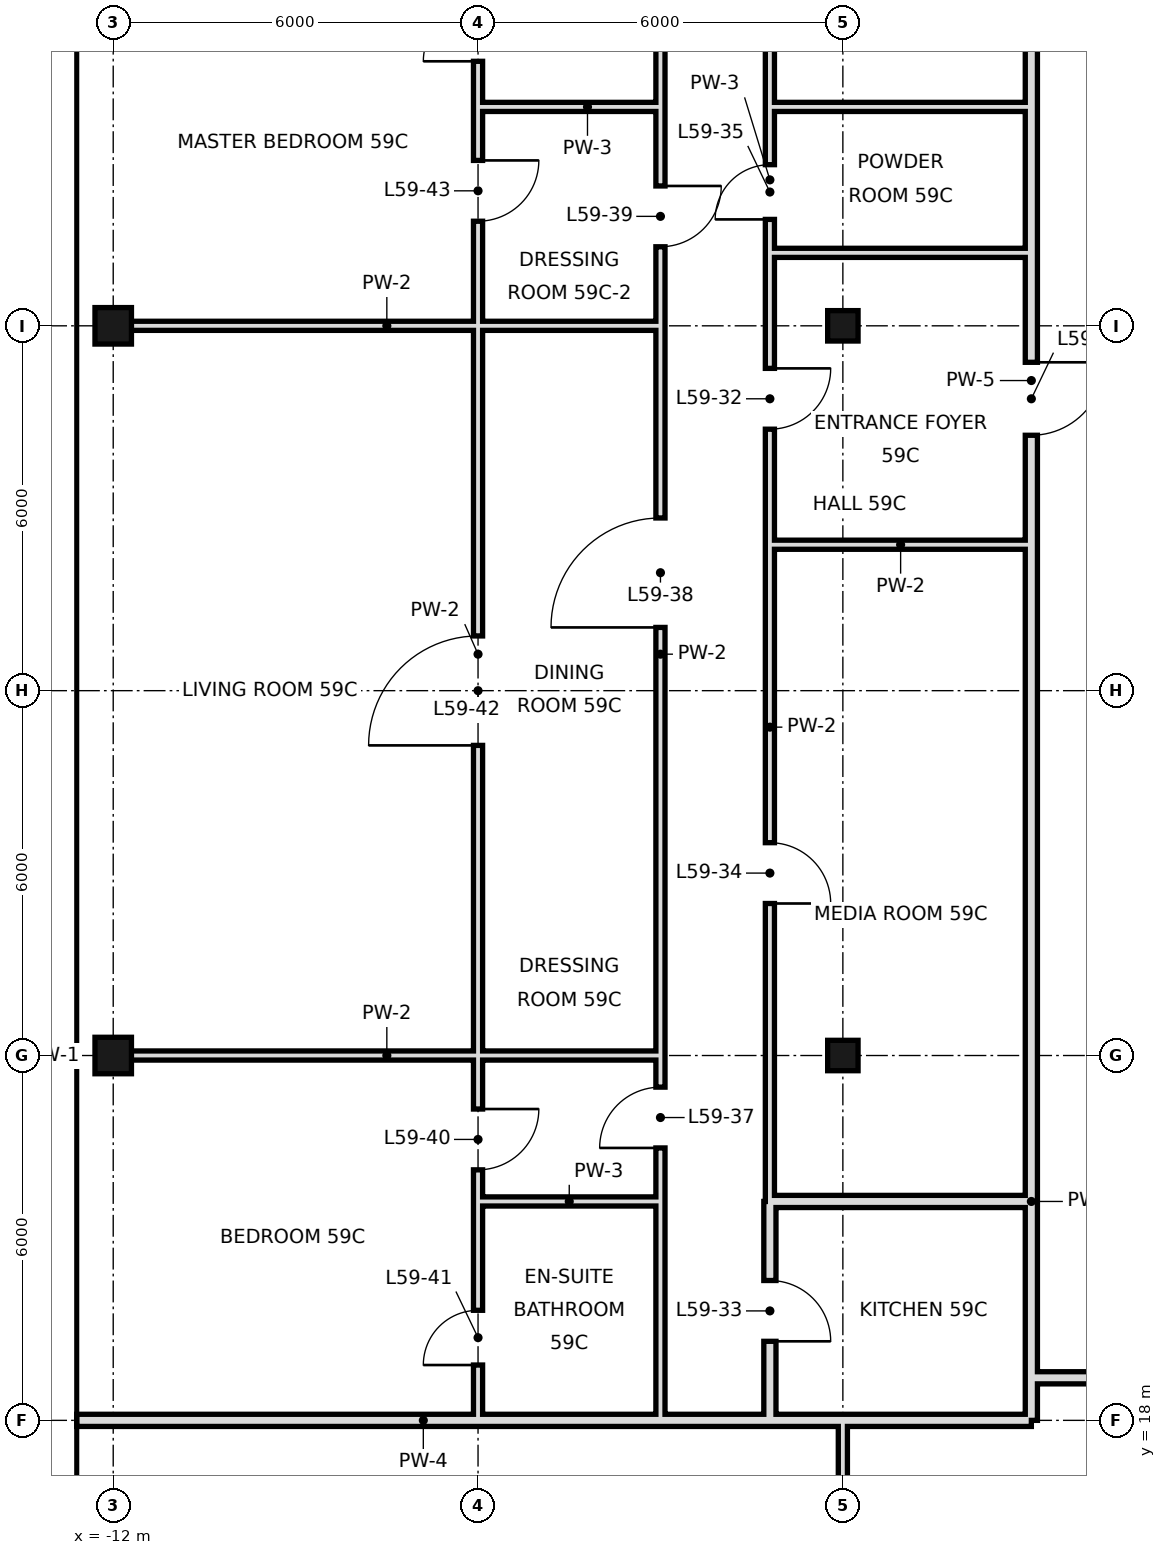
"""IFC4 building model, lengths in metres.
Left out: names, types, materials, properties, quantities, classifications, styles, units other than length and angle.
Written with IfcOpenShell. Run it as: python <this file> out.ifc"""

import sys

from ifc_helpers import new_model, si_unit, direction, frame, frame_2d, origin, origin_2d, place, context, subcontext, project, spatial, rectangle, hollow_rectangle, extrude, element, fill, save


model = new_model("IFC4")
c1 = context("Model", 3, precision=1e-05, world=origin(), true_north=direction((0.0, 1.0)))
c2 = subcontext(c1, "Body", "Model", "MODEL_VIEW")
j1 = project(units=[si_unit("LENGTHUNIT", "METRE"), si_unit("PLANEANGLEUNIT", "RADIAN")], contexts=[c1])
p1 = place(None, origin())
s1 = spatial("IfcSite", under=j1, at=p1, CompositionType="ELEMENT")
p2 = place(p1, origin())
s2 = spatial("IfcBuilding", under=s1, at=p2, CompositionType="ELEMENT")
p3 = place(p2, frame((0.0, 0.0, 250.4)))
s3 = spatial("IfcBuildingStorey", under=s2, at=p3, CompositionType="ELEMENT", Elevation=250.4)
for number, where, z_axis, x_axis in (
    (1, (-12.0, 24.0, 0.0), (0.0, 0.0, 1.0), (1.0, 0.0, 0.0)),
    (2, (-12.0, 36.0, 0.0), (0.0, 0.0, 1.0), (1.0, 0.0, 0.0)),
):
    element("IfcColumn", number, at=place(p3, frame(where, z_axis=z_axis, x_axis=x_axis)), inside=s3, PredefinedType="COLUMN", context=c2, shape_type="SweptSolid", body=[
        extrude(hollow_rectangle(XDim=0.6, YDim=0.6, WallThickness=0.028, at=origin_2d()), origin(), (0.0, 0.0, 1.0), 3.6),
    ])
for number, where, z_axis, x_axis in (
    (3, (0.0, 24.0, 0.0), (0.0, 0.0, 1.0), (1.0, 0.0, 0.0)),
    (4, (0.0, 36.0, 0.0), (0.0, 0.0, 1.0), (1.0, 0.0, 0.0)),
):
    element("IfcColumn", number, at=place(p3, frame(where, z_axis=z_axis, x_axis=x_axis)), inside=s3, PredefinedType="COLUMN", context=c2, shape_type="SweptSolid", body=[
        extrude(hollow_rectangle(XDim=0.5, YDim=0.5, WallThickness=0.025, at=origin_2d()), origin(), (0.0, 0.0, 1.0), 3.6),
    ])
p4 = place(p3, frame((-1.2, 18.0, 0.0), z_axis=(0.0, 0.0, 1.0), x_axis=(0.0, 1.0, 0.0)))
e5 = element("IfcWall", 5, at=p4, inside=s3, PredefinedType="SOLIDWALL", context=c2, shape_type="SweptSolid", body=[
    extrude(rectangle(XDim=3.6, YDim=0.2, at=frame_2d((1.8, 0.0))), origin(), (0.0, 0.0, 1.0), 2.72),
])
p5 = place(p4, frame((1.3, 0.0, 0.0)))
e6 = element("IfcOpeningElement", 6, at=p5, cuts=e5, PredefinedType="OPENING", context=c2, shape_type="SweptSolid", body=[
    extrude(rectangle(XDim=1.0, YDim=2.4, at=frame_2d((0.5, 1.2))), frame((0.0, 0.11, 0.0), z_axis=(0.0, -1.0, 0.0), x_axis=(1.0, 0.0, 0.0)), (0.0, 0.0, 1.0), 0.22),
])
p6 = place(p3, frame((-1.2, 21.6, 0.0), z_axis=(0.0, 0.0, 1.0), x_axis=(0.0, 1.0, 0.0)))
e7 = element("IfcWall", 7, at=p6, inside=s3, PredefinedType="PARTITIONING", context=c2, shape_type="SweptSolid", body=[
    extrude(rectangle(XDim=15.6, YDim=0.15, at=frame_2d((7.8, 0.0))), origin(), (0.0, 0.0, 1.0), 3.42),
])
p7 = place(p6, frame((12.7, 0.0, 0.0)))
e8 = element("IfcOpeningElement", 8, at=p7, cuts=e7, PredefinedType="OPENING", context=c2, shape_type="SweptSolid", body=[
    extrude(rectangle(XDim=1.0, YDim=2.4, at=frame_2d((0.5, 1.2))), frame((0.0, 0.085, 0.0), z_axis=(0.0, -1.0, 0.0), x_axis=(1.0, 0.0, 0.0)), (0.0, 0.0, 1.0), 0.17),
])
p8 = place(p6, frame((4.9, 0.0, 0.0)))
e9 = element("IfcOpeningElement", 9, at=p8, cuts=e7, PredefinedType="OPENING", context=c2, shape_type="SweptSolid", body=[
    extrude(rectangle(XDim=1.0, YDim=2.4, at=frame_2d((0.5, 1.2))), frame((0.0, 0.085, 0.0), z_axis=(0.0, -1.0, 0.0), x_axis=(1.0, 0.0, 0.0)), (0.0, 0.0, 1.0), 0.17),
])
p9 = place(p3, frame((-1.2, 39.6, 0.0), z_axis=(0.0, 0.0, 1.0), x_axis=(0.0, 1.0, 0.0)))
e10 = element("IfcWall", 10, at=p9, inside=s3, PredefinedType="PARTITIONING", context=c2, shape_type="SweptSolid", body=[
    extrude(rectangle(XDim=9.0, YDim=0.15, at=frame_2d((4.5, 0.0))), origin(), (0.0, 0.0, 1.0), 3.42),
])
p10 = place(p9, frame((2.32, 0.0, 0.0)))
e11 = element("IfcOpeningElement", 11, at=p10, cuts=e10, PredefinedType="OPENING", context=c2, shape_type="SweptSolid", body=[
    extrude(rectangle(XDim=1.0, YDim=2.4, at=frame_2d((0.5, 1.2))), frame((0.0, 0.085, 0.0), z_axis=(0.0, -1.0, 0.0), x_axis=(1.0, 0.0, 0.0)), (0.0, 0.0, 1.0), 0.17),
])
p11 = place(p3, frame((-1.2, 37.2, 0.0), z_axis=(0.0, 0.0, 1.0), x_axis=(0.0, 1.0, 0.0)))
e12 = element("IfcWall", 12, at=p11, inside=s3, PredefinedType="PARTITIONING", context=c2, shape_type="SweptSolid", body=[
    extrude(rectangle(XDim=2.4, YDim=0.15, at=frame_2d((1.2, 0.0))), origin(), (0.0, 0.0, 1.0), 3.42),
])
p12 = place(p11, frame((0.55, 0.0, 0.0)))
e13 = element("IfcOpeningElement", 13, at=p12, cuts=e12, PredefinedType="OPENING", context=c2, shape_type="SweptSolid", body=[
    extrude(rectangle(XDim=0.9, YDim=2.4, at=frame_2d((0.45, 1.2))), frame((0.0, 0.085, 0.0), z_axis=(0.0, -1.0, 0.0), x_axis=(1.0, 0.0, 0.0)), (0.0, 0.0, 1.0), 0.17),
])
p13 = place(p3, frame((-3.0, 21.6, 0.0), z_axis=(0.0, 0.0, 1.0), x_axis=(0.0, 1.0, 0.0)))
e14 = element("IfcWall", 14, at=p13, inside=s3, PredefinedType="PARTITIONING", context=c2, shape_type="SweptSolid", body=[
    extrude(rectangle(XDim=18.0, YDim=0.15, at=frame_2d((9.0, 0.0))), origin(), (0.0, 0.0, 1.0), 3.42),
])
p14 = place(p13, frame((0.88, 0.0, 0.0)))
e15 = element("IfcOpeningElement", 15, at=p14, cuts=e14, PredefinedType="OPENING", context=c2, shape_type="SweptSolid", body=[
    extrude(rectangle(XDim=1.0, YDim=2.4, at=frame_2d((0.5, 1.2))), frame((0.0, 0.085, 0.0), z_axis=(0.0, -1.0, 0.0), x_axis=(1.0, 0.0, 0.0)), (0.0, 0.0, 1.0), 0.17),
])
p15 = place(p13, frame((9.44, 0.0, 0.0)))
e16 = element("IfcOpeningElement", 16, at=p15, cuts=e14, PredefinedType="OPENING", context=c2, shape_type="SweptSolid", body=[
    extrude(rectangle(XDim=1.8, YDim=2.4, at=frame_2d((0.9, 1.2))), frame((0.0, 0.085, 0.0), z_axis=(0.0, -1.0, 0.0), x_axis=(1.0, 0.0, 0.0)), (0.0, 0.0, 1.0), 0.17),
])
p16 = place(p13, frame((15.7, 0.0, 0.0)))
e17 = element("IfcOpeningElement", 17, at=p16, cuts=e14, PredefinedType="OPENING", context=c2, shape_type="SweptSolid", body=[
    extrude(rectangle(XDim=1.0, YDim=2.4, at=frame_2d((0.5, 1.2))), frame((0.0, 0.085, 0.0), z_axis=(0.0, -1.0, 0.0), x_axis=(1.0, 0.0, 0.0)), (0.0, 0.0, 1.0), 0.17),
])
p17 = place(p3, frame((-3.0, 18.0, 0.0), z_axis=(0.0, 0.0, 1.0), x_axis=(0.0, 1.0, 0.0)))
e18 = element("IfcWall", 18, at=p17, inside=s3, PredefinedType="PARTITIONING", context=c2, shape_type="SweptSolid", body=[
    extrude(rectangle(XDim=3.6, YDim=0.15, at=frame_2d((1.8, 0.0))), origin(), (0.0, 0.0, 1.0), 3.42),
])
p18 = place(p3, frame((-3.0, 39.6, 0.0), z_axis=(0.0, 0.0, 1.0), x_axis=(0.0, 1.0, 0.0)))
e19 = element("IfcWall", 19, at=p18, inside=s3, PredefinedType="PARTITIONING", context=c2, shape_type="SweptSolid", body=[
    extrude(rectangle(XDim=9.0, YDim=0.15, at=frame_2d((4.5, 0.0))), origin(), (0.0, 0.0, 1.0), 3.42),
])
p19 = place(p3, frame((-6.0, 21.6, 0.0), z_axis=(0.0, 0.0, 1.0), x_axis=(0.0, 1.0, 0.0)))
e20 = element("IfcWall", 20, at=p19, inside=s3, PredefinedType="PARTITIONING", context=c2, shape_type="SweptSolid", body=[
    extrude(rectangle(XDim=18.0, YDim=0.15, at=frame_2d((9.0, 0.0))), origin(), (0.0, 0.0, 1.0), 3.42),
])
p20 = place(p19, frame((0.52, 0.0, 0.0)))
e21 = element("IfcOpeningElement", 21, at=p20, cuts=e20, PredefinedType="OPENING", context=c2, shape_type="SweptSolid", body=[
    extrude(rectangle(XDim=1.0, YDim=2.4, at=frame_2d((0.5, 1.2))), frame((0.0, 0.085, 0.0), z_axis=(0.0, -1.0, 0.0), x_axis=(1.0, 0.0, 0.0)), (0.0, 0.0, 1.0), 0.17),
])
p21 = place(p19, frame((7.5, 0.0, 0.0)))
e22 = element("IfcOpeningElement", 22, at=p21, cuts=e20, PredefinedType="OPENING", context=c2, shape_type="SweptSolid", body=[
    extrude(rectangle(XDim=1.8, YDim=2.4, at=frame_2d((0.9, 1.2))), frame((0.0, 0.085, 0.0), z_axis=(0.0, -1.0, 0.0), x_axis=(1.0, 0.0, 0.0)), (0.0, 0.0, 1.0), 0.17),
])
p22 = place(p19, frame((16.12, 0.0, 0.0)))
e23 = element("IfcOpeningElement", 23, at=p22, cuts=e20, PredefinedType="OPENING", context=c2, shape_type="SweptSolid", body=[
    extrude(rectangle(XDim=1.0, YDim=2.4, at=frame_2d((0.5, 1.2))), frame((0.0, 0.085, 0.0), z_axis=(0.0, -1.0, 0.0), x_axis=(1.0, 0.0, 0.0)), (0.0, 0.0, 1.0), 0.17),
])
p23 = place(p3, frame((-6.0, 18.0, 0.0), z_axis=(0.0, 0.0, 1.0), x_axis=(0.0, 1.0, 0.0)))
e24 = element("IfcWall", 24, at=p23, inside=s3, PredefinedType="PARTITIONING", context=c2, shape_type="SweptSolid", body=[
    extrude(rectangle(XDim=3.6, YDim=0.15, at=frame_2d((1.8, 0.0))), origin(), (0.0, 0.0, 1.0), 3.42),
])
p24 = place(p23, frame((0.91, 0.0, 0.0)))
e25 = element("IfcOpeningElement", 25, at=p24, cuts=e24, PredefinedType="OPENING", context=c2, shape_type="SweptSolid", body=[
    extrude(rectangle(XDim=0.9, YDim=2.4, at=frame_2d((0.45, 1.2))), frame((0.0, 0.085, 0.0), z_axis=(0.0, -1.0, 0.0), x_axis=(1.0, 0.0, 0.0)), (0.0, 0.0, 1.0), 0.17),
])
p25 = place(p3, frame((-6.0, 39.6, 0.0), z_axis=(0.0, 0.0, 1.0), x_axis=(0.0, 1.0, 0.0)))
e26 = element("IfcWall", 26, at=p25, inside=s3, PredefinedType="PARTITIONING", context=c2, shape_type="SweptSolid", body=[
    extrude(rectangle(XDim=8.4, YDim=0.15, at=frame_2d((4.2, 0.0))), origin(), (0.0, 0.0, 1.0), 3.42),
])
p26 = place(p25, frame((0.75, 0.0, 0.0)))
e27 = element("IfcOpeningElement", 27, at=p26, cuts=e26, PredefinedType="OPENING", context=c2, shape_type="SweptSolid", body=[
    extrude(rectangle(XDim=0.9, YDim=2.4, at=frame_2d((0.45, 1.2))), frame((0.0, 0.085, 0.0), z_axis=(0.0, -1.0, 0.0), x_axis=(1.0, 0.0, 0.0)), (0.0, 0.0, 1.0), 0.17),
])
p27 = place(p3, frame((0.0, 10.8, 0.0), z_axis=(0.0, 0.0, 1.0), x_axis=(0.0, 1.0, 0.0)))
e28 = element("IfcWall", 28, at=p27, inside=s3, PredefinedType="PARTITIONING", context=c2, shape_type="SweptSolid", body=[
    extrude(rectangle(XDim=7.2, YDim=0.15, at=frame_2d((3.6, 0.0))), origin(), (0.0, 0.0, 1.0), 2.72),
])
p28 = place(p3, frame((3.1, 21.6, 0.0), z_axis=(0.0, 0.0, 1.0), x_axis=(0.0, 1.0, 0.0)))
e29 = element("IfcWall", 29, at=p28, inside=s3, PredefinedType="SOLIDWALL", context=c2, shape_type="SweptSolid", body=[
    extrude(rectangle(XDim=27.0, YDim=0.2, at=frame_2d((13.5, 0.0))), origin(), (0.0, 0.0, 1.0), 2.72),
])
p29 = place(p28, frame((12.6, 0.0, 0.0)))
e30 = element("IfcOpeningElement", 30, at=p29, cuts=e29, PredefinedType="OPENING", context=c2, shape_type="SweptSolid", body=[
    extrude(rectangle(XDim=1.2, YDim=2.4, at=frame_2d((0.6, 1.2))), frame((0.0, 0.11, 0.0), z_axis=(0.0, -1.0, 0.0), x_axis=(1.0, 0.0, 0.0)), (0.0, 0.0, 1.0), 0.22),
])
p30 = place(p3, frame((3.1, 18.0, 0.0), z_axis=(0.0, 0.0, 1.0), x_axis=(0.0, 1.0, 0.0)))
e31 = element("IfcWall", 31, at=p30, inside=s3, PredefinedType="SOLIDWALL", context=c2, shape_type="SweptSolid", body=[
    extrude(rectangle(XDim=3.6, YDim=0.2, at=frame_2d((1.8, 0.0))), origin(), (0.0, 0.0, 1.0), 2.97),
])
p31 = place(p3, frame((-1.2, 18.0, 0.0), z_axis=(0.0, 0.0, 1.0), x_axis=(1.0, 0.0, 0.0)))
e32 = element("IfcWall", 32, at=p31, inside=s3, PredefinedType="SOLIDWALL", context=c2, shape_type="SweptSolid", body=[
    extrude(rectangle(XDim=4.3, YDim=0.2, at=frame_2d((2.15, 0.0))), origin(), (0.0, 0.0, 1.0), 2.72),
])
p32 = place(p3, frame((-12.6, 18.0, 0.0), z_axis=(0.0, 0.0, 1.0), x_axis=(1.0, 0.0, 0.0)))
e33 = element("IfcWall", 33, at=p32, inside=s3, PredefinedType="SOLIDWALL", context=c2, shape_type="SweptSolid", body=[
    extrude(rectangle(XDim=11.4, YDim=0.2, at=frame_2d((5.7, 0.0))), origin(), (0.0, 0.0, 1.0), 2.72),
])
p33 = place(p3, frame((3.1, 18.7, 0.0), z_axis=(0.0, 0.0, 1.0), x_axis=(1.0, 0.0, 0.0)))
e34 = element("IfcWall", 34, at=p33, inside=s3, PredefinedType="SOLIDWALL", context=c2, shape_type="SweptSolid", body=[
    extrude(rectangle(XDim=5.3, YDim=0.2, at=frame_2d((2.65, 0.0))), origin(), (0.0, 0.0, 1.0), 2.72),
])
p34 = place(p3, frame((-1.2, 21.6, 0.0), z_axis=(0.0, 0.0, 1.0), x_axis=(1.0, 0.0, 0.0)))
e35 = element("IfcWall", 35, at=p34, inside=s3, PredefinedType="SOLIDWALL", context=c2, shape_type="SweptSolid", body=[
    extrude(rectangle(XDim=4.3, YDim=0.2, at=frame_2d((2.15, 0.0))), origin(), (0.0, 0.0, 1.0), 2.72),
])
p35 = place(p3, frame((-6.0, 21.6, 0.0), z_axis=(0.0, 0.0, 1.0), x_axis=(1.0, 0.0, 0.0)))
e36 = element("IfcWall", 36, at=p35, inside=s3, PredefinedType="PARTITIONING", context=c2, shape_type="SweptSolid", body=[
    extrude(rectangle(XDim=3.0, YDim=0.15, at=frame_2d((1.5, 0.0))), origin(), (0.0, 0.0, 1.0), 3.42),
])
p36 = place(p3, frame((-12.0, 24.0, 0.0), z_axis=(0.0, 0.0, 1.0), x_axis=(1.0, 0.0, 0.0)))
e37 = element("IfcWall", 37, at=p36, inside=s3, PredefinedType="PARTITIONING", context=c2, shape_type="SweptSolid", body=[
    extrude(rectangle(XDim=9.0, YDim=0.15, at=frame_2d((4.5, 0.0))), origin(), (0.0, 0.0, 1.0), 2.72),
])
p37 = place(p3, frame((-1.2, 32.4, 0.0), z_axis=(0.0, 0.0, 1.0), x_axis=(1.0, 0.0, 0.0)))
e38 = element("IfcWall", 38, at=p37, inside=s3, PredefinedType="PARTITIONING", context=c2, shape_type="SweptSolid", body=[
    extrude(rectangle(XDim=4.3, YDim=0.15, at=frame_2d((2.15, 0.0))), origin(), (0.0, 0.0, 1.0), 3.42),
])
p38 = place(p3, frame((-12.0, 36.0, 0.0), z_axis=(0.0, 0.0, 1.0), x_axis=(1.0, 0.0, 0.0)))
e39 = element("IfcWall", 39, at=p38, inside=s3, PredefinedType="PARTITIONING", context=c2, shape_type="SweptSolid", body=[
    extrude(rectangle(XDim=9.0, YDim=0.15, at=frame_2d((4.5, 0.0))), origin(), (0.0, 0.0, 1.0), 2.72),
])
p39 = place(p3, frame((-1.2, 37.2, 0.0), z_axis=(0.0, 0.0, 1.0), x_axis=(1.0, 0.0, 0.0)))
e40 = element("IfcWall", 40, at=p39, inside=s3, PredefinedType="PARTITIONING", context=c2, shape_type="SweptSolid", body=[
    extrude(rectangle(XDim=4.3, YDim=0.15, at=frame_2d((2.15, 0.0))), origin(), (0.0, 0.0, 1.0), 3.42),
])
p40 = place(p3, frame((-6.0, 39.6, 0.0), z_axis=(0.0, 0.0, 1.0), x_axis=(1.0, 0.0, 0.0)))
e41 = element("IfcWall", 41, at=p40, inside=s3, PredefinedType="PARTITIONING", context=c2, shape_type="SweptSolid", body=[
    extrude(rectangle(XDim=3.0, YDim=0.15, at=frame_2d((1.5, 0.0))), origin(), (0.0, 0.0, 1.0), 3.42),
])
p41 = place(p3, frame((-1.2, 39.6, 0.0), z_axis=(0.0, 0.0, 1.0), x_axis=(1.0, 0.0, 0.0)))
e42 = element("IfcWall", 42, at=p41, inside=s3, PredefinedType="PARTITIONING", context=c2, shape_type="SweptSolid", body=[
    extrude(rectangle(XDim=4.3, YDim=0.15, at=frame_2d((2.15, 0.0))), origin(), (0.0, 0.0, 1.0), 3.42),
])
p42 = place(p7, origin())
e43 = element("IfcDoor", 43, at=p42, inside=s3, OperationType="SINGLE_SWING_RIGHT", PredefinedType="DOOR", context=c2, shape_type="SweptSolid", body=[
    extrude(rectangle(XDim=1.0, YDim=2.4, at=frame_2d((0.5, 1.2))), frame((0.0, 0.025, 0.0), z_axis=(0.0, -1.0, 0.0), x_axis=(1.0, 0.0, 0.0)), (0.0, 0.0, 1.0), 0.05),
])
fill(e8, e43)
p43 = place(p5, frame((1.0, 0.0, 0.0), z_axis=(0.0, 0.0, 1.0), x_axis=(-1.0, 0.0, 0.0)))
e44 = element("IfcDoor", 44, at=p43, inside=s3, OperationType="SINGLE_SWING_RIGHT", PredefinedType="DOOR", context=c2, shape_type="SweptSolid", body=[
    extrude(rectangle(XDim=1.0, YDim=2.4, at=frame_2d((0.5, 1.2))), frame((0.0, 0.025, 0.0), z_axis=(0.0, -1.0, 0.0), x_axis=(1.0, 0.0, 0.0)), (0.0, 0.0, 1.0), 0.05),
])
fill(e6, e44)
p44 = place(p8, frame((1.0, 0.0, 0.0), z_axis=(0.0, 0.0, 1.0), x_axis=(-1.0, 0.0, 0.0)))
e45 = element("IfcDoor", 45, at=p44, inside=s3, OperationType="SINGLE_SWING_RIGHT", PredefinedType="DOOR", context=c2, shape_type="SweptSolid", body=[
    extrude(rectangle(XDim=1.0, YDim=2.4, at=frame_2d((0.5, 1.2))), frame((0.0, 0.025, 0.0), z_axis=(0.0, -1.0, 0.0), x_axis=(1.0, 0.0, 0.0)), (0.0, 0.0, 1.0), 0.05),
])
fill(e9, e45)
p45 = place(p12, origin())
e46 = element("IfcDoor", 46, at=p45, inside=s3, OperationType="SINGLE_SWING_LEFT", PredefinedType="DOOR", context=c2, shape_type="SweptSolid", body=[
    extrude(rectangle(XDim=0.9, YDim=2.4, at=frame_2d((0.45, 1.2))), frame((0.0, 0.025, 0.0), z_axis=(0.0, -1.0, 0.0), x_axis=(1.0, 0.0, 0.0)), (0.0, 0.0, 1.0), 0.05),
])
fill(e13, e46)
p46 = place(p14, origin())
e47 = element("IfcDoor", 47, at=p46, inside=s3, OperationType="SINGLE_SWING_LEFT", PredefinedType="DOOR", context=c2, shape_type="SweptSolid", body=[
    extrude(rectangle(XDim=1.0, YDim=2.4, at=frame_2d((0.5, 1.2))), frame((0.0, 0.025, 0.0), z_axis=(0.0, -1.0, 0.0), x_axis=(1.0, 0.0, 0.0)), (0.0, 0.0, 1.0), 0.05),
])
fill(e15, e47)
p47 = place(p15, origin())
e48 = element("IfcDoor", 48, at=p47, inside=s3, OperationType="SINGLE_SWING_LEFT", PredefinedType="DOOR", context=c2, shape_type="SweptSolid", body=[
    extrude(rectangle(XDim=1.8, YDim=2.4, at=frame_2d((0.9, 1.2))), frame((0.0, 0.025, 0.0), z_axis=(0.0, -1.0, 0.0), x_axis=(1.0, 0.0, 0.0)), (0.0, 0.0, 1.0), 0.05),
])
fill(e16, e48)
p48 = place(p16, origin())
e49 = element("IfcDoor", 49, at=p48, inside=s3, OperationType="SINGLE_SWING_RIGHT", PredefinedType="DOOR", context=c2, shape_type="SweptSolid", body=[
    extrude(rectangle(XDim=1.0, YDim=2.4, at=frame_2d((0.5, 1.2))), frame((0.0, 0.025, 0.0), z_axis=(0.0, -1.0, 0.0), x_axis=(1.0, 0.0, 0.0)), (0.0, 0.0, 1.0), 0.05),
])
fill(e17, e49)
p49 = place(p20, origin())
e50 = element("IfcDoor", 50, at=p49, inside=s3, OperationType="SINGLE_SWING_RIGHT", PredefinedType="DOOR", context=c2, shape_type="SweptSolid", body=[
    extrude(rectangle(XDim=1.0, YDim=2.4, at=frame_2d((0.5, 1.2))), frame((0.0, 0.025, 0.0), z_axis=(0.0, -1.0, 0.0), x_axis=(1.0, 0.0, 0.0)), (0.0, 0.0, 1.0), 0.05),
])
fill(e21, e50)
p50 = place(p24, origin())
e51 = element("IfcDoor", 51, at=p50, inside=s3, OperationType="SINGLE_SWING_LEFT", PredefinedType="DOOR", context=c2, shape_type="SweptSolid", body=[
    extrude(rectangle(XDim=0.9, YDim=2.4, at=frame_2d((0.45, 1.2))), frame((0.0, 0.025, 0.0), z_axis=(0.0, -1.0, 0.0), x_axis=(1.0, 0.0, 0.0)), (0.0, 0.0, 1.0), 0.05),
])
fill(e25, e51)
p51 = place(p21, origin())
e52 = element("IfcDoor", 52, at=p51, inside=s3, OperationType="SINGLE_SWING_LEFT", PredefinedType="DOOR", context=c2, shape_type="SweptSolid", body=[
    extrude(rectangle(XDim=1.8, YDim=2.4, at=frame_2d((0.9, 1.2))), frame((0.0, 0.025, 0.0), z_axis=(0.0, -1.0, 0.0), x_axis=(1.0, 0.0, 0.0)), (0.0, 0.0, 1.0), 0.05),
])
fill(e22, e52)
p52 = place(p22, origin())
e53 = element("IfcDoor", 53, at=p52, inside=s3, OperationType="SINGLE_SWING_RIGHT", PredefinedType="DOOR", context=c2, shape_type="SweptSolid", body=[
    extrude(rectangle(XDim=1.0, YDim=2.4, at=frame_2d((0.5, 1.2))), frame((0.0, 0.025, 0.0), z_axis=(0.0, -1.0, 0.0), x_axis=(1.0, 0.0, 0.0)), (0.0, 0.0, 1.0), 0.05),
])
fill(e23, e53)
p53 = place(p26, origin())
e54 = element("IfcDoor", 54, at=p53, inside=s3, OperationType="SINGLE_SWING_LEFT", PredefinedType="DOOR", context=c2, shape_type="SweptSolid", body=[
    extrude(rectangle(XDim=0.9, YDim=2.4, at=frame_2d((0.45, 1.2))), frame((0.0, 0.025, 0.0), z_axis=(0.0, -1.0, 0.0), x_axis=(1.0, 0.0, 0.0)), (0.0, 0.0, 1.0), 0.05),
])
fill(e27, e54)
p54 = place(p29, origin())
e55 = element("IfcDoor", 55, at=p54, inside=s3, OperationType="SINGLE_SWING_RIGHT", PredefinedType="DOOR", context=c2, shape_type="SweptSolid", body=[
    extrude(rectangle(XDim=1.2, YDim=2.4, at=frame_2d((0.6, 1.2))), frame((0.0, 0.025, 0.0), z_axis=(0.0, -1.0, 0.0), x_axis=(1.0, 0.0, 0.0)), (0.0, 0.0, 1.0), 0.05),
])
fill(e30, e55)
save(model, sys.argv[1])
